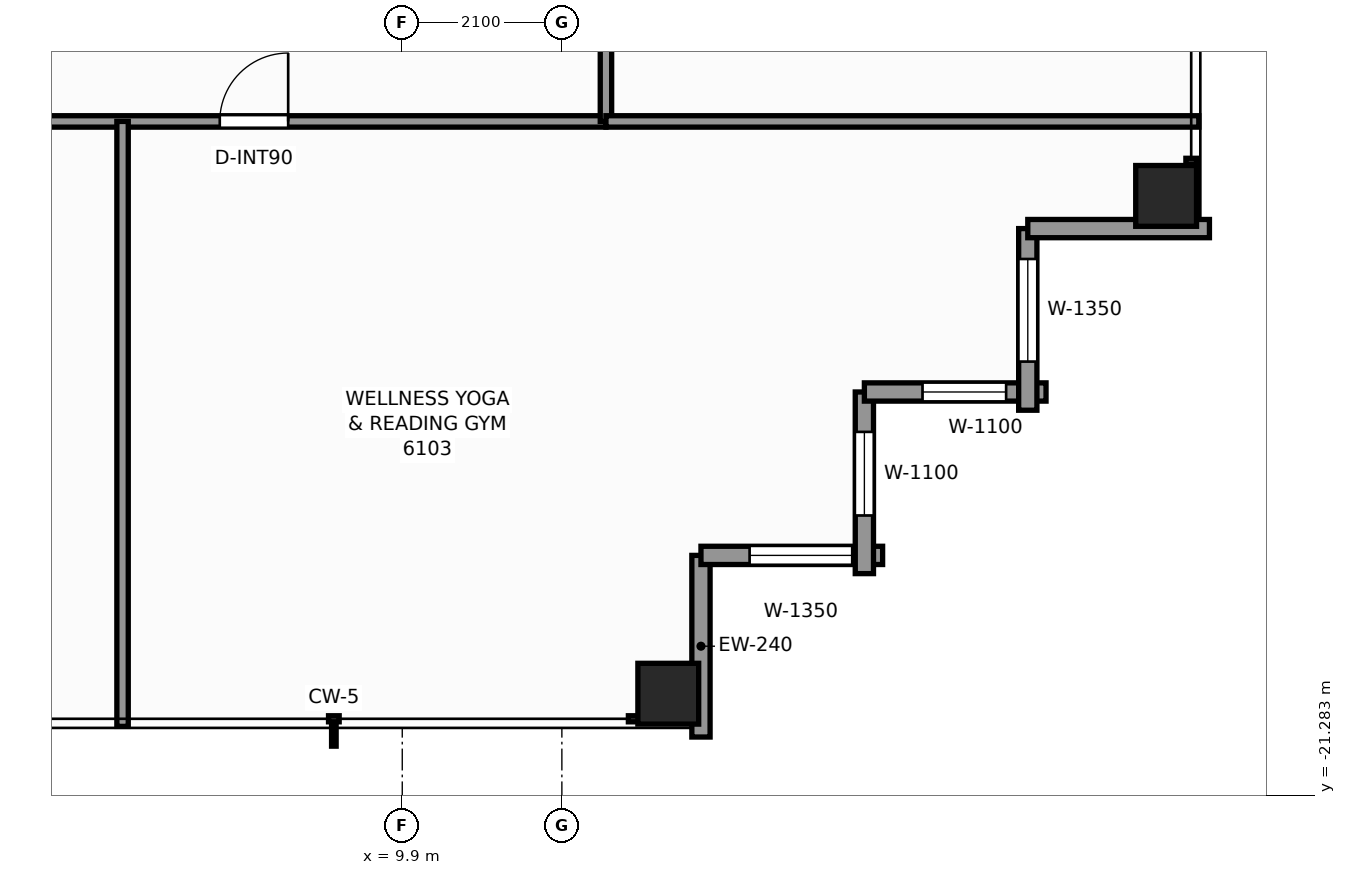
"""IFC4 building model, lengths in metres.
Left out: names, types, materials, properties, quantities, classifications, styles, units other than length and angle.
Written with IfcOpenShell. Run it as: python <this file> out.ifc"""

import sys

from ifc_helpers import new_model, si_unit, direction, frame, frame_2d, origin, origin_2d, place, context, subcontext, project, spatial, rectangle, extrude, element, fill, save


model = new_model("IFC4")
c1 = context("Model", 3, precision=1e-05, world=origin(), true_north=direction((0.0, 1.0)))
c2 = subcontext(c1, "Body", "Model", "MODEL_VIEW")
j1 = project(units=[si_unit("LENGTHUNIT", "METRE"), si_unit("PLANEANGLEUNIT", "RADIAN")], contexts=[c1])
p1 = place(None, origin())
s1 = spatial("IfcSite", under=j1, at=p1, CompositionType="ELEMENT")
p2 = place(p1, origin())
s2 = spatial("IfcBuilding", under=s1, at=p2, CompositionType="ELEMENT")
p3 = place(p2, frame((0.0, 0.0, 209.7)))
s3 = spatial("IfcBuildingStorey", under=s2, at=p3, CompositionType="ELEMENT", Elevation=209.7)
for number, where, z_axis, x_axis in (
    (1, (13.4, -19.95, 0.0), (0.0, 0.0, 1.0), (1.0, 0.0, 0.0)),
    (2, (19.95, -13.4, 0.0), (0.0, 0.0, 1.0), (1.0, 0.0, 0.0)),
):
    element("IfcColumn", number, at=place(p3, frame(where, z_axis=z_axis, x_axis=x_axis)), inside=s3, PredefinedType="COLUMN", context=c2, shape_type="SweptSolid", body=[
        extrude(rectangle(XDim=0.8, YDim=0.8, at=origin_2d()), origin(), (0.0, 0.0, 1.0), 3.3),
    ])
p4 = place(p3, frame((13.83, -18.13, 0.0), z_axis=(0.0, 0.0, 1.0), x_axis=(0.0, -1.0, 0.0)))
e3 = element("IfcWall", 3, at=p4, inside=s3, PredefinedType="STANDARD", context=c2, shape_type="SweptSolid", body=[
    extrude(rectangle(XDim=2.39, YDim=0.24, at=frame_2d((1.195, 0.0))), origin(), (0.0, 0.0, 1.0), 2.463),
])
p5 = place(p3, frame((16.22, -18.13, 0.0), z_axis=(0.0, 0.0, 1.0), x_axis=(-1.0, 0.0, 0.0)))
e4 = element("IfcWall", 4, at=p5, inside=s3, PredefinedType="STANDARD", context=c2, shape_type="SweptSolid", body=[
    extrude(rectangle(XDim=2.39, YDim=0.24, at=frame_2d((1.195, 0.0))), origin(), (0.0, 0.0, 1.0), 2.463),
])
p6 = place(p5, frame((0.4, 0.0, 0.65)))
e5 = element("IfcOpeningElement", 5, at=p6, cuts=e4, PredefinedType="OPENING", context=c2, shape_type="SweptSolid", body=[
    extrude(rectangle(XDim=1.35, YDim=1.55, at=frame_2d((0.675, 0.775))), frame((0.0, 0.13, 0.0), z_axis=(0.0, -1.0, 0.0), x_axis=(1.0, 0.0, 0.0)), (0.0, 0.0, 1.0), 0.26),
])
p7 = place(p3, frame((15.98, -15.98, 0.0), z_axis=(0.0, 0.0, 1.0), x_axis=(0.0, -1.0, 0.0)))
e6 = element("IfcWall", 6, at=p7, inside=s3, PredefinedType="STANDARD", context=c2, shape_type="SweptSolid", body=[
    extrude(rectangle(XDim=2.39, YDim=0.24, at=frame_2d((1.195, 0.0))), origin(), (0.0, 0.0, 1.0), 2.463),
])
p8 = place(p7, frame((0.525, 0.0, 0.65)))
e7 = element("IfcOpeningElement", 7, at=p8, cuts=e6, PredefinedType="OPENING", context=c2, shape_type="SweptSolid", body=[
    extrude(rectangle(XDim=1.1, YDim=1.45, at=frame_2d((0.55, 0.725))), frame((0.0, 0.13, 0.0), z_axis=(0.0, -1.0, 0.0), x_axis=(1.0, 0.0, 0.0)), (0.0, 0.0, 1.0), 0.26),
])
p9 = place(p3, frame((18.37, -15.98, 0.0), z_axis=(0.0, 0.0, 1.0), x_axis=(-1.0, 0.0, 0.0)))
e8 = element("IfcWall", 8, at=p9, inside=s3, PredefinedType="STANDARD", context=c2, shape_type="SweptSolid", body=[
    extrude(rectangle(XDim=2.39, YDim=0.24, at=frame_2d((1.195, 0.0))), origin(), (0.0, 0.0, 1.0), 2.463),
])
p10 = place(p9, frame((0.525, 0.0, 0.65)))
e9 = element("IfcOpeningElement", 9, at=p10, cuts=e8, PredefinedType="OPENING", context=c2, shape_type="SweptSolid", body=[
    extrude(rectangle(XDim=1.1, YDim=1.45, at=frame_2d((0.55, 0.725))), frame((0.0, 0.13, 0.0), z_axis=(0.0, -1.0, 0.0), x_axis=(1.0, 0.0, 0.0)), (0.0, 0.0, 1.0), 0.26),
])
p11 = place(p3, frame((18.13, -13.83, 0.0), z_axis=(0.0, 0.0, 1.0), x_axis=(0.0, -1.0, 0.0)))
e10 = element("IfcWall", 10, at=p11, inside=s3, PredefinedType="STANDARD", context=c2, shape_type="SweptSolid", body=[
    extrude(rectangle(XDim=2.39, YDim=0.24, at=frame_2d((1.195, 0.0))), origin(), (0.0, 0.0, 1.0), 2.463),
])
p12 = place(p11, frame((0.4, 0.0, 0.65)))
e11 = element("IfcOpeningElement", 11, at=p12, cuts=e10, PredefinedType="OPENING", context=c2, shape_type="SweptSolid", body=[
    extrude(rectangle(XDim=1.35, YDim=1.55, at=frame_2d((0.675, 0.775))), frame((0.0, 0.13, 0.0), z_axis=(0.0, -1.0, 0.0), x_axis=(1.0, 0.0, 0.0)), (0.0, 0.0, 1.0), 0.26),
])
p13 = place(p3, frame((20.52, -13.83, 0.0), z_axis=(0.0, 0.0, 1.0), x_axis=(-1.0, 0.0, 0.0)))
e12 = element("IfcWall", 12, at=p13, inside=s3, PredefinedType="STANDARD", context=c2, shape_type="SweptSolid", body=[
    extrude(rectangle(XDim=2.39, YDim=0.24, at=frame_2d((1.195, 0.0))), origin(), (0.0, 0.0, 1.0), 2.463),
])
p14 = place(p3, frame((-12.58, -12.42, 0.0), z_axis=(0.0, 0.0, 1.0), x_axis=(1.0, 0.0, 0.0)))
e13 = element("IfcWall", 13, at=p14, inside=s3, PredefinedType="PARTITIONING", context=c2, shape_type="SweptSolid", body=[
    extrude(rectangle(XDim=25.16, YDim=0.15, at=frame_2d((12.58, 0.0))), origin(), (0.0, 0.0, 1.0), 2.369),
])
p15 = place(p14, frame((4.595, 0.0, 0.0)))
e14 = element("IfcOpeningElement", 14, at=p15, cuts=e13, PredefinedType="OPENING", context=c2, shape_type="SweptSolid", body=[
    extrude(rectangle(XDim=0.9, YDim=2.06, at=frame_2d((0.45, 1.03))), frame((0.0, 0.085, 0.0), z_axis=(0.0, -1.0, 0.0), x_axis=(1.0, 0.0, 0.0)), (0.0, 0.0, 1.0), 0.17),
])
p16 = place(p14, frame((10.1, 0.0, 0.0)))
e15 = element("IfcOpeningElement", 15, at=p16, cuts=e13, PredefinedType="OPENING", context=c2, shape_type="SweptSolid", body=[
    extrude(rectangle(XDim=0.9, YDim=2.06, at=frame_2d((0.45, 1.03))), frame((0.0, 0.085, 0.0), z_axis=(0.0, -1.0, 0.0), x_axis=(1.0, 0.0, 0.0)), (0.0, 0.0, 1.0), 0.17),
])
p17 = place(p14, frame((20.079, 0.0, 0.0)))
e16 = element("IfcOpeningElement", 16, at=p17, cuts=e13, PredefinedType="OPENING", context=c2, shape_type="SweptSolid", body=[
    extrude(rectangle(XDim=0.9, YDim=2.06, at=frame_2d((0.45, 1.03))), frame((0.0, 0.085, 0.0), z_axis=(0.0, -1.0, 0.0), x_axis=(1.0, 0.0, 0.0)), (0.0, 0.0, 1.0), 0.17),
])
p18 = place(p3, frame((12.58, -12.42, 0.0), z_axis=(0.0, 0.0, 1.0), x_axis=(0.0, 1.0, 0.0)))
e17 = element("IfcWall", 17, at=p18, inside=s3, PredefinedType="PARTITIONING", context=c2, shape_type="SweptSolid", body=[
    extrude(rectangle(XDim=24.84, YDim=0.15, at=frame_2d((12.42, 0.0))), origin(), (0.0, 0.0, 1.0), 2.369),
])
p19 = place(p18, frame((4.318, 0.0, 0.0)))
e18 = element("IfcOpeningElement", 18, at=p19, cuts=e17, PredefinedType="OPENING", context=c2, shape_type="SweptSolid", body=[
    extrude(rectangle(XDim=0.9, YDim=2.06, at=frame_2d((0.45, 1.03))), frame((0.0, 0.085, 0.0), z_axis=(0.0, -1.0, 0.0), x_axis=(1.0, 0.0, 0.0)), (0.0, 0.0, 1.0), 0.17),
])
p20 = place(p18, frame((9.94, 0.0, 0.0)))
e19 = element("IfcOpeningElement", 19, at=p20, cuts=e17, PredefinedType="OPENING", context=c2, shape_type="SweptSolid", body=[
    extrude(rectangle(XDim=0.9, YDim=2.06, at=frame_2d((0.45, 1.03))), frame((0.0, 0.085, 0.0), z_axis=(0.0, -1.0, 0.0), x_axis=(1.0, 0.0, 0.0)), (0.0, 0.0, 1.0), 0.17),
])
p21 = place(p18, frame((20.968, 0.0, 0.0)))
e20 = element("IfcOpeningElement", 20, at=p21, cuts=e17, PredefinedType="OPENING", context=c2, shape_type="SweptSolid", body=[
    extrude(rectangle(XDim=0.95, YDim=2.06, at=frame_2d((0.475, 1.03))), frame((0.0, 0.085, 0.0), z_axis=(0.0, -1.0, 0.0), x_axis=(1.0, 0.0, 0.0)), (0.0, 0.0, 1.0), 0.17),
])
p22 = place(p3, frame((12.58, -12.42, 0.0), z_axis=(0.0, 0.0, 1.0), x_axis=(1.0, 0.0, 0.0)))
e21 = element("IfcWall", 21, at=p22, inside=s3, PredefinedType="PARTITIONING", context=c2, shape_type="SweptSolid", body=[
    extrude(rectangle(XDim=7.8, YDim=0.15, at=frame_2d((3.9, 0.0))), origin(), (0.0, 0.0, 1.0), 2.369),
])
p23 = place(p3, frame((6.22, -20.38, 0.0), z_axis=(0.0, 0.0, 1.0), x_axis=(0.0, 1.0, 0.0)))
e22 = element("IfcWall", 22, at=p23, inside=s3, PredefinedType="PARTITIONING", context=c2, shape_type="SweptSolid", body=[
    extrude(rectangle(XDim=7.96, YDim=0.15, at=frame_2d((3.98, 0.0))), origin(), (0.0, 0.0, 1.0), 2.453),
])
p24 = place(p6, origin())
e23 = element("IfcWindow", 23, at=p24, inside=s3, PartitioningType="SINGLE_PANEL", PredefinedType="WINDOW", context=c2, shape_type="SweptSolid", body=[
    extrude(rectangle(XDim=1.35, YDim=1.55, at=frame_2d((0.675, 0.775))), frame((0.0, 0.03, 0.0), z_axis=(0.0, -1.0, 0.0), x_axis=(1.0, 0.0, 0.0)), (0.0, 0.0, 1.0), 0.06),
])
fill(e5, e23)
p25 = place(p8, origin())
e24 = element("IfcWindow", 24, at=p25, inside=s3, PartitioningType="SINGLE_PANEL", PredefinedType="WINDOW", context=c2, shape_type="SweptSolid", body=[
    extrude(rectangle(XDim=1.1, YDim=1.45, at=frame_2d((0.55, 0.725))), frame((0.0, 0.03, 0.0), z_axis=(0.0, -1.0, 0.0), x_axis=(1.0, 0.0, 0.0)), (0.0, 0.0, 1.0), 0.06),
])
fill(e7, e24)
p26 = place(p10, origin())
e25 = element("IfcWindow", 25, at=p26, inside=s3, PartitioningType="SINGLE_PANEL", PredefinedType="WINDOW", context=c2, shape_type="SweptSolid", body=[
    extrude(rectangle(XDim=1.1, YDim=1.45, at=frame_2d((0.55, 0.725))), frame((0.0, 0.03, 0.0), z_axis=(0.0, -1.0, 0.0), x_axis=(1.0, 0.0, 0.0)), (0.0, 0.0, 1.0), 0.06),
])
fill(e9, e25)
p27 = place(p12, origin())
e26 = element("IfcWindow", 26, at=p27, inside=s3, PartitioningType="SINGLE_PANEL", PredefinedType="WINDOW", context=c2, shape_type="SweptSolid", body=[
    extrude(rectangle(XDim=1.35, YDim=1.55, at=frame_2d((0.675, 0.775))), frame((0.0, 0.03, 0.0), z_axis=(0.0, -1.0, 0.0), x_axis=(1.0, 0.0, 0.0)), (0.0, 0.0, 1.0), 0.06),
])
fill(e11, e26)
p28 = place(p17, origin())
e27 = element("IfcDoor", 27, at=p28, inside=s3, OperationType="SINGLE_SWING_RIGHT", PredefinedType="DOOR", context=c2, shape_type="SweptSolid", body=[
    extrude(rectangle(XDim=0.9, YDim=2.06, at=frame_2d((0.45, 1.03))), frame((0.0, 0.025, 0.0), z_axis=(0.0, -1.0, 0.0), x_axis=(1.0, 0.0, 0.0)), (0.0, 0.0, 1.0), 0.05),
])
fill(e16, e27)
save(model, sys.argv[1])
